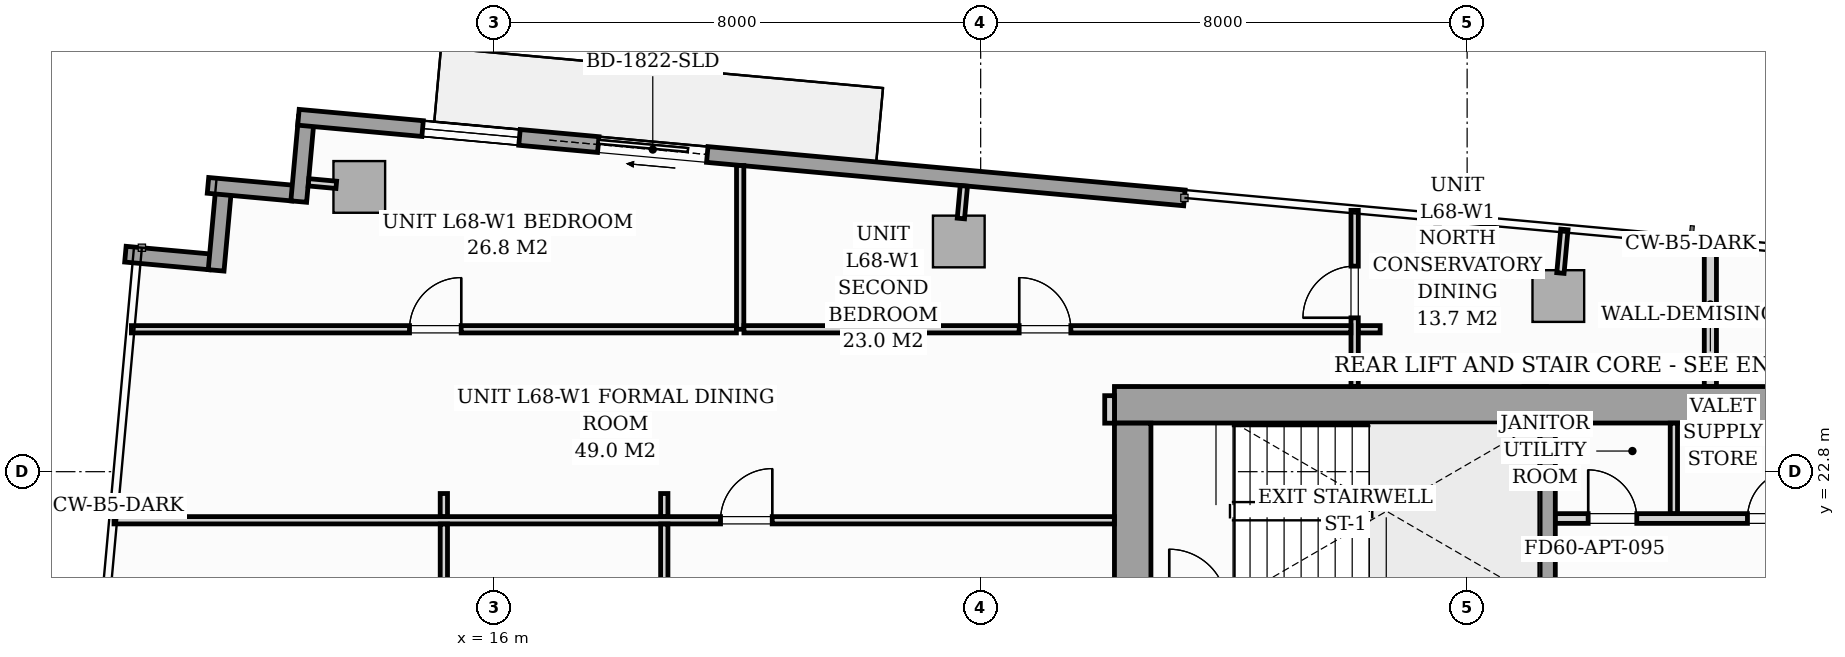
"""IFC4 building model, lengths in metres.
Left out: names, types, materials, properties, quantities, classifications, styles, units other than length and angle.
Written with IfcOpenShell. Run it as: python <this file> out.ifc"""

import sys

from ifc_helpers import new_model, si_unit, direction, frame, frame_2d, origin, origin_2d, place, context, subcontext, project, spatial, rectangle, i_section, extrude, source, transform, mapped, element, fill, save


model = new_model("IFC4")
c1 = context("Model", 3, precision=1e-05, world=origin(), true_north=direction((0.0, 1.0)))
c2 = subcontext(c1, "Body", "Model", "MODEL_VIEW")
j1 = project(units=[si_unit("LENGTHUNIT", "METRE"), si_unit("PLANEANGLEUNIT", "RADIAN")], contexts=[c1])
p1 = place(None, origin())
s1 = spatial("IfcSite", under=j1, at=p1, CompositionType="ELEMENT")
p2 = place(p1, origin())
s2 = spatial("IfcBuilding", under=s1, at=p2, CompositionType="ELEMENT")
p3 = place(p2, frame((0.0, 0.0, 236.4)))
s3 = spatial("IfcBuildingStorey", under=s2, at=p3, CompositionType="ELEMENT", Elevation=236.4)
m1 = source(origin(), c2, "Body", "SweptSolid", [
    extrude(i_section(OverallWidth=0.409, OverallDepth=0.425, WebThickness=0.033, FlangeThickness=0.052, FilletRadius=0.018, at=origin_2d()), origin(), (0.0, 0.0, 1.0), 3.296),
])
for number, where, z_axis, x_axis in (
    (1, (26.4, 24.0, 0.002), (0.0, 0.0, 1.0), (1.0, 0.0, 0.0)),
    (2, (33.12, 24.0, 0.002), (0.0, 0.0, 1.0), (1.0, 0.0, 0.0)),
):
    element("IfcColumn", number, at=place(p3, frame(where, z_axis=z_axis, x_axis=x_axis)), inside=s3, PredefinedType="PILASTER", context=c2, shape_type="MappedRepresentation", body=[
        mapped(m1, transform((0.0, 0.0, 0.0), scale=1.0)),
    ])
m2 = source(origin(), c2, "Body", "SweptSolid", [
    extrude(rectangle(XDim=0.85, YDim=0.85, at=origin_2d()), origin(), (0.0, 0.0, 1.0), 3.296),
])
for number, where, z_axis, x_axis in (
    (3, (13.781, 27.483, 0.002), (0.0, 0.0, 1.0), (0.996, -0.091, 0.0)),
    (4, (23.64, 26.585, 0.002), (0.0, 0.0, 1.0), (0.996, -0.091, 0.0)),
    (5, (33.5, 25.688, 0.002), (0.0, 0.0, 1.0), (0.996, -0.091, 0.0)),
):
    element("IfcColumn", number, at=place(p3, frame(where, z_axis=z_axis, x_axis=x_axis)), inside=s3, PredefinedType="COLUMN", context=c2, shape_type="MappedRepresentation", body=[
        mapped(m2, transform((0.0, 0.0, 0.0), scale=1.0)),
    ])
for number, where, z_axis, x_axis in (
    (6, (9.935, 26.377, 0.0), (0.0, 0.0, 1.0), (0.996, -0.091, 0.0)),
    (7, (11.427, 26.111, 0.0), (0.0, 0.0, 1.0), (0.091, 0.996, 0.0)),
):
    element("IfcWall", number, at=place(p3, frame(where, z_axis=z_axis, x_axis=x_axis)), inside=s3, PredefinedType="STANDARD", context=c2, shape_type="SweptSolid", body=[
        extrude(rectangle(XDim=1.395, YDim=0.26, at=frame_2d((0.698, 0.0))), origin(), (0.0, 0.0, 1.0), 3.04),
    ])
p4 = place(p3, frame((11.293, 27.508, 0.0), z_axis=(0.0, 0.0, 1.0), x_axis=(0.995883159782, -0.090646191665, 0.0)))
e8 = element("IfcWall", 8, at=p4, inside=s3, PredefinedType="STANDARD", context=c2, shape_type="SweptSolid", body=[
    extrude(rectangle(XDim=1.395, YDim=0.26, at=frame_2d((0.698, 0.0))), origin(), (0.0, 0.0, 1.0), 3.04),
])
p5 = place(p3, frame((12.785, 27.242, 0.0), z_axis=(0.0, 0.0, 1.0), x_axis=(0.090472632758, 0.995898942023, 0.0)))
e9 = element("IfcWall", 9, at=p5, inside=s3, PredefinedType="STANDARD", context=c2, shape_type="SweptSolid", body=[
    extrude(rectangle(XDim=1.395, YDim=0.26, at=frame_2d((0.698, 0.0))), origin(), (0.0, 0.0, 1.0), 3.04),
])
p6 = place(p3, frame((12.781, 28.628, 0.0), z_axis=(0.0, 0.0, 1.0), x_axis=(0.995884584572, -0.090630536861, 0.0)))
e10 = element("IfcWall", 10, at=p6, inside=s3, PredefinedType="STANDARD", context=c2, shape_type="SweptSolid", body=[
    extrude(rectangle(XDim=14.63, YDim=0.26, at=frame_2d((7.315, 0.0))), origin(), (0.0, 0.0, 1.0), 3.04),
])
p7 = place(p6, frame((4.951, 0.0, 0.0)))
e11 = element("IfcOpeningElement", 11, at=p7, cuts=e10, PredefinedType="OPENING", context=c2, shape_type="SweptSolid", body=[
    extrude(rectangle(XDim=1.8, YDim=2.06, at=frame_2d((0.9, 1.03))), frame((0.0, 0.14, 0.0), z_axis=(0.0, -1.0, 0.0), x_axis=(1.0, 0.0, 0.0)), (0.0, 0.0, 1.0), 0.28),
])
p8 = place(p6, frame((2.05, 0.0, 0.65)))
e12 = element("IfcOpeningElement", 12, at=p8, cuts=e10, PredefinedType="OPENING", context=c2, shape_type="SweptSolid", body=[
    extrude(rectangle(XDim=1.6, YDim=1.5, at=frame_2d((0.8, 0.75))), frame((0.0, 0.14, 0.0), z_axis=(0.0, -1.0, 0.0), x_axis=(1.0, 0.0, 0.0)), (0.0, 0.0, 1.0), 0.28),
])
p9 = place(p3, frame((26.2, 23.9, 0.0), z_axis=(0.0, 0.0, 1.0), x_axis=(1.0, 0.0, 0.0)))
e13 = element("IfcWall", 13, at=p9, inside=s3, PredefinedType="SHEAR", context=c2, shape_type="SweptSolid", body=[
    extrude(rectangle(XDim=19.6, YDim=0.6, at=frame_2d((9.8, 0.0))), origin(), (0.0, 0.0, 1.0), 3.3),
])
p10 = place(p3, frame((26.5, 17.802, 0.0), z_axis=(0.0, 0.0, 1.0), x_axis=(0.0, 1.0, 0.0)))
e14 = element("IfcWall", 14, at=p10, inside=s3, PredefinedType="SHEAR", context=c2, shape_type="SweptSolid", body=[
    extrude(rectangle(XDim=5.796, YDim=0.6, at=frame_2d((2.898, 0.0))), origin(), (0.0, 0.0, 1.0), 3.3),
])
p11 = place(p3, frame((33.325, 20.702, 0.0), z_axis=(0.0, 0.0, 1.0), x_axis=(0.0, 1.0, 0.0)))
e15 = element("IfcWall", 15, at=p11, inside=s3, PredefinedType="SOLIDWALL", context=c2, shape_type="SweptSolid", body=[
    extrude(rectangle(XDim=2.896, YDim=0.25, at=frame_2d((1.448, 0.0))), origin(), (0.0, 0.0, 1.0), 3.3),
])
p12 = place(p3, frame((33.452, 22.03, 0.0), z_axis=(0.0, 0.0, 1.0), x_axis=(1.0, 0.0, 0.0)))
e16 = element("IfcWall", 16, at=p12, inside=s3, PredefinedType="PARTITIONING", context=c2, shape_type="SweptSolid", body=[
    extrude(rectangle(XDim=5.096, YDim=0.16, at=frame_2d((2.548, 0.0))), origin(), (0.0, 0.0, 1.0), 3.04),
])
p13 = place(p12, frame((0.538, 0.0, 0.0)))
e17 = element("IfcOpeningElement", 17, at=p13, cuts=e16, PredefinedType="OPENING", context=c2, shape_type="SweptSolid", body=[
    extrude(rectangle(XDim=0.8, YDim=2.05, at=frame_2d((0.4, 1.025))), frame((0.0, 0.09, 0.0), z_axis=(0.0, -1.0, 0.0), x_axis=(1.0, 0.0, 0.0)), (0.0, 0.0, 1.0), 0.18),
])
p14 = place(p12, frame((3.158, 0.0, 0.0)))
e18 = element("IfcOpeningElement", 18, at=p14, cuts=e16, PredefinedType="OPENING", context=c2, shape_type="SweptSolid", body=[
    extrude(rectangle(XDim=0.8, YDim=2.05, at=frame_2d((0.4, 1.025))), frame((0.0, 0.09, 0.0), z_axis=(0.0, -1.0, 0.0), x_axis=(1.0, 0.0, 0.0)), (0.0, 0.0, 1.0), 0.18),
])
p15 = place(p3, frame((35.4, 22.112, 0.0), z_axis=(0.0, 0.0, 1.0), x_axis=(0.0, 1.0, 0.0)))
e19 = element("IfcWall", 19, at=p15, inside=s3, PredefinedType="PARTITIONING", context=c2, shape_type="SweptSolid", body=[
    extrude(rectangle(XDim=1.486, YDim=0.12, at=frame_2d((0.743, 0.0))), origin(), (0.0, 0.0, 1.0), 3.04),
])
p16 = place(p3, frame((26.12, 23.598, 0.0), z_axis=(0.0, 0.0, 1.0), x_axis=(0.0, 1.0, 0.0)))
e20 = element("IfcWall", 20, at=p16, inside=s3, PredefinedType="PARTITIONING", context=c2, shape_type="SweptSolid", body=[
    extrude(rectangle(XDim=0.452, YDim=0.16, at=frame_2d((0.226, 0.0))), origin(), (0.0, 0.0, 1.0), 3.04),
])
p17 = place(p3, frame((36.0, 24.202, 0.0), z_axis=(0.0, 0.0, 1.0), x_axis=(0.0, 1.0, 0.0)))
e21 = element("IfcWall", 21, at=p17, inside=s3, PredefinedType="PARTITIONING", context=c2, shape_type="SweptSolid", body=[
    extrude(rectangle(XDim=2.363, YDim=0.2, at=frame_2d((1.182, 0.0))), origin(), (0.0, 0.0, 1.0), 3.04),
])
p18 = place(p3, frame((30.15, 24.202, 0.0), z_axis=(0.0, 0.0, 1.0), x_axis=(0.0, 1.0, 0.0)))
e22 = element("IfcWall", 22, at=p18, inside=s3, PredefinedType="PARTITIONING", context=c2, shape_type="SweptSolid", body=[
    extrude(rectangle(XDim=2.896, YDim=0.12, at=frame_2d((1.448, 0.0))), origin(), (0.0, 0.0, 1.0), 3.04),
])
p19 = place(p18, frame((1.128, 0.0, 0.0)))
e23 = element("IfcOpeningElement", 23, at=p19, cuts=e22, PredefinedType="OPENING", context=c2, shape_type="SweptSolid", body=[
    extrude(rectangle(XDim=0.85, YDim=2.05, at=frame_2d((0.425, 1.025))), frame((0.0, 0.07, 0.0), z_axis=(0.0, -1.0, 0.0), x_axis=(1.0, 0.0, 0.0)), (0.0, 0.0, 1.0), 0.14),
])
p20 = place(p3, frame((20.045, 25.142, 0.0), z_axis=(0.0, 0.0, 1.0), x_axis=(0.0, 1.0, 0.0)))
e24 = element("IfcWall", 24, at=p20, inside=s3, PredefinedType="PARTITIONING", context=c2, shape_type="SweptSolid", body=[
    extrude(rectangle(XDim=2.692, YDim=0.12, at=frame_2d((1.346, 0.0))), origin(), (0.0, 0.0, 1.0), 3.04),
])
p21 = place(p3, frame((10.034, 25.142, 0.0), z_axis=(0.0, 0.0, 1.0), x_axis=(1.0, 0.0, 0.0)))
e25 = element("IfcWall", 25, at=p21, inside=s3, PredefinedType="PARTITIONING", context=c2, shape_type="SweptSolid", body=[
    extrude(rectangle(XDim=9.949, YDim=0.12, at=frame_2d((4.975, 0.0))), origin(), (0.0, 0.0, 1.0), 3.04),
])
p22 = place(p21, frame((4.573, 0.0, 0.0)))
e26 = element("IfcOpeningElement", 26, at=p22, cuts=e25, PredefinedType="OPENING", context=c2, shape_type="SweptSolid", body=[
    extrude(rectangle(XDim=0.85, YDim=2.05, at=frame_2d((0.425, 1.025))), frame((0.0, 0.07, 0.0), z_axis=(0.0, -1.0, 0.0), x_axis=(1.0, 0.0, 0.0)), (0.0, 0.0, 1.0), 0.14),
])
p23 = place(p3, frame((20.107, 25.142, 0.0), z_axis=(0.0, 0.0, 1.0), x_axis=(1.0, 0.0, 0.0)))
e27 = element("IfcWall", 27, at=p23, inside=s3, PredefinedType="PARTITIONING", context=c2, shape_type="SweptSolid", body=[
    extrude(rectangle(XDim=9.981, YDim=0.12, at=frame_2d((4.99, 0.0))), origin(), (0.0, 0.0, 1.0), 3.04),
])
p24 = place(p23, frame((4.526, 0.0, 0.0)))
e28 = element("IfcOpeningElement", 28, at=p24, cuts=e27, PredefinedType="OPENING", context=c2, shape_type="SweptSolid", body=[
    extrude(rectangle(XDim=0.85, YDim=2.05, at=frame_2d((0.425, 1.025))), frame((0.0, 0.07, 0.0), z_axis=(0.0, -1.0, 0.0), x_axis=(1.0, 0.0, 0.0)), (0.0, 0.0, 1.0), 0.14),
])
p25 = place(p3, frame((30.212, 25.142, 0.0), z_axis=(0.0, 0.0, 1.0), x_axis=(1.0, 0.0, 0.0)))
e29 = element("IfcWall", 29, at=p25, inside=s3, PredefinedType="PARTITIONING", context=c2, shape_type="SweptSolid", body=[
    extrude(rectangle(XDim=0.358, YDim=0.12, at=frame_2d((0.179, 0.0))), origin(), (0.0, 0.0, 1.0), 3.04),
])
p26 = place(p3, frame((9.748, 22.001, 0.0), z_axis=(0.0, 0.0, 1.0), x_axis=(1.0, 0.0, 0.0)))
e30 = element("IfcWall", 30, at=p26, inside=s3, PredefinedType="PARTITIONING", context=c2, shape_type="SweptSolid", body=[
    extrude(rectangle(XDim=16.45, YDim=0.12, at=frame_2d((8.225, 0.0))), origin(), (0.0, 0.0, 1.0), 3.04),
])
p27 = place(p26, frame((9.974, 0.0, 0.0)))
e31 = element("IfcOpeningElement", 31, at=p27, cuts=e30, PredefinedType="OPENING", context=c2, shape_type="SweptSolid", body=[
    extrude(rectangle(XDim=0.85, YDim=2.05, at=frame_2d((0.425, 1.025))), frame((0.0, 0.07, 0.0), z_axis=(0.0, -1.0, 0.0), x_axis=(1.0, 0.0, 0.0)), (0.0, 0.0, 1.0), 0.14),
])
p28 = place(p3, frame((15.172, 11.858, 0.0), z_axis=(0.0, 0.0, 1.0), x_axis=(0.0, 1.0, 0.0)))
e32 = element("IfcWall", 32, at=p28, inside=s3, PredefinedType="PARTITIONING", context=c2, shape_type="SweptSolid", body=[
    extrude(rectangle(XDim=10.081, YDim=0.12, at=frame_2d((5.041, 0.0))), origin(), (0.0, 0.0, 1.0), 3.04),
])
p29 = place(p28, frame((4.615, 0.0, 0.0)))
e33 = element("IfcOpeningElement", 33, at=p29, cuts=e32, PredefinedType="OPENING", context=c2, shape_type="SweptSolid", body=[
    extrude(rectangle(XDim=0.85, YDim=2.05, at=frame_2d((0.425, 1.025))), frame((0.0, 0.07, 0.0), z_axis=(0.0, -1.0, 0.0), x_axis=(1.0, 0.0, 0.0)), (0.0, 0.0, 1.0), 0.14),
])
p30 = place(p3, frame((15.172, 22.063, 0.0), z_axis=(0.0, 0.0, 1.0), x_axis=(0.0, 1.0, 0.0)))
e34 = element("IfcWall", 34, at=p30, inside=s3, PredefinedType="PARTITIONING", context=c2, shape_type="SweptSolid", body=[
    extrude(rectangle(XDim=0.378, YDim=0.12, at=frame_2d((0.189, 0.0))), origin(), (0.0, 0.0, 1.0), 3.04),
])
p31 = place(p3, frame((18.797, 11.858, 0.0), z_axis=(0.0, 0.0, 1.0), x_axis=(0.0, 1.0, 0.0)))
e35 = element("IfcWall", 35, at=p31, inside=s3, PredefinedType="PARTITIONING", context=c2, shape_type="SweptSolid", body=[
    extrude(rectangle(XDim=10.081, YDim=0.12, at=frame_2d((5.041, 0.0))), origin(), (0.0, 0.0, 1.0), 3.04),
])
p32 = place(p31, frame((4.615, 0.0, 0.0)))
e36 = element("IfcOpeningElement", 36, at=p32, cuts=e35, PredefinedType="OPENING", context=c2, shape_type="SweptSolid", body=[
    extrude(rectangle(XDim=0.85, YDim=2.05, at=frame_2d((0.425, 1.025))), frame((0.0, 0.07, 0.0), z_axis=(0.0, -1.0, 0.0), x_axis=(1.0, 0.0, 0.0)), (0.0, 0.0, 1.0), 0.14),
])
p33 = place(p3, frame((18.797, 22.063, 0.0), z_axis=(0.0, 0.0, 1.0), x_axis=(0.0, 1.0, 0.0)))
e37 = element("IfcWall", 37, at=p33, inside=s3, PredefinedType="PARTITIONING", context=c2, shape_type="SweptSolid", body=[
    extrude(rectangle(XDim=0.378, YDim=0.12, at=frame_2d((0.189, 0.0))), origin(), (0.0, 0.0, 1.0), 3.04),
])
p34 = place(p3, frame((13.403, 27.517, 0.0), z_axis=(0.0, 0.0, 1.0), x_axis=(-0.995884462012, 0.090631883588, 0.0)))
e38 = element("IfcWall", 38, at=p34, inside=s3, PredefinedType="PARTITIONING", context=c2, shape_type="SweptSolid", body=[
    extrude(rectangle(XDim=0.458, YDim=0.12, at=frame_2d((0.229, 0.0))), origin(), (0.0, 0.0, 1.0), 3.04),
])
p35 = place(p3, frame((23.675, 26.964, 0.0), z_axis=(0.0, 0.0, 1.0), x_axis=(0.090740281653, 0.995874591144, 0.0)))
e39 = element("IfcWall", 39, at=p35, inside=s3, PredefinedType="PARTITIONING", context=c2, shape_type="SweptSolid", body=[
    extrude(rectangle(XDim=0.538, YDim=0.12, at=frame_2d((0.269, 0.0))), origin(), (0.0, 0.0, 1.0), 3.04),
])
p36 = place(p3, frame((33.534, 26.067, 0.0), z_axis=(0.0, 0.0, 1.0), x_axis=(0.090535746043, 0.995893206468, 0.0)))
e40 = element("IfcWall", 40, at=p36, inside=s3, PredefinedType="PARTITIONING", context=c2, shape_type="SweptSolid", body=[
    extrude(rectangle(XDim=0.72, YDim=0.12, at=frame_2d((0.36, 0.0))), origin(), (0.0, 0.0, 1.0), 3.04),
])
m3 = source(origin(), c2, "Body", "SweptSolid", [
    extrude(rectangle(XDim=1.8, YDim=2.06, at=frame_2d((0.9, 1.03))), frame((0.0, 0.025, 0.0), z_axis=(0.0, -1.0, 0.0), x_axis=(1.0, 0.0, 0.0)), (0.0, 0.0, 1.0), 0.05),
])
p37 = place(p7, origin())
e41 = element("IfcDoor", 41, at=p37, inside=s3, OperationType="SLIDING_TO_LEFT", PredefinedType="DOOR", context=c2, shape_type="MappedRepresentation", body=[
    mapped(m3, transform((0.0, 0.0, 0.0), scale=1.0)),
])
fill(e11, e41)
m4 = source(origin(), c2, "Body", "SweptSolid", [
    extrude(rectangle(XDim=1.6, YDim=1.5, at=frame_2d((0.8, 0.75))), frame((0.0, 0.03, 0.0), z_axis=(0.0, -1.0, 0.0), x_axis=(1.0, 0.0, 0.0)), (0.0, 0.0, 1.0), 0.06),
])
p38 = place(p8, origin())
e42 = element("IfcWindow", 42, at=p38, inside=s3, PartitioningType="SINGLE_PANEL", PredefinedType="WINDOW", context=c2, shape_type="MappedRepresentation", body=[
    mapped(m4, transform((0.0, 0.0, 0.0), scale=1.0)),
])
fill(e12, e42)
m5 = source(origin(), c2, "Body", "SweptSolid", [
    extrude(rectangle(XDim=0.8, YDim=2.05, at=frame_2d((0.4, 1.025))), frame((0.0, 0.025, 0.0), z_axis=(0.0, -1.0, 0.0), x_axis=(1.0, 0.0, 0.0)), (0.0, 0.0, 1.0), 0.05),
])
p39 = place(p13, origin())
e43 = element("IfcDoor", 43, at=p39, inside=s3, OperationType="SINGLE_SWING_LEFT", PredefinedType="DOOR", context=c2, shape_type="MappedRepresentation", body=[
    mapped(m5, transform((0.0, 0.0, 0.0), scale=1.0)),
])
fill(e17, e43)
p40 = place(p14, origin())
e44 = element("IfcDoor", 44, at=p40, inside=s3, OperationType="SINGLE_SWING_RIGHT", PredefinedType="DOOR", context=c2, shape_type="MappedRepresentation", body=[
    mapped(m5, transform((0.0, 0.0, 0.0), scale=1.0)),
])
fill(e18, e44)
m6 = source(origin(), c2, "Body", "SweptSolid", [
    extrude(rectangle(XDim=0.85, YDim=2.05, at=frame_2d((0.425, 1.025))), frame((0.0, 0.025, 0.0), z_axis=(0.0, -1.0, 0.0), x_axis=(1.0, 0.0, 0.0)), (0.0, 0.0, 1.0), 0.05),
])
p41 = place(p19, origin())
e45 = element("IfcDoor", 45, at=p41, inside=s3, OperationType="SINGLE_SWING_LEFT", PredefinedType="DOOR", context=c2, shape_type="MappedRepresentation", body=[
    mapped(m6, transform((0.0, 0.0, 0.0), scale=1.0)),
])
fill(e23, e45)
p42 = place(p22, origin())
e46 = element("IfcDoor", 46, at=p42, inside=s3, OperationType="SINGLE_SWING_RIGHT", PredefinedType="DOOR", context=c2, shape_type="MappedRepresentation", body=[
    mapped(m6, transform((0.0, 0.0, 0.0), scale=1.0)),
])
fill(e26, e46)
p43 = place(p24, origin())
e47 = element("IfcDoor", 47, at=p43, inside=s3, OperationType="SINGLE_SWING_LEFT", PredefinedType="DOOR", context=c2, shape_type="MappedRepresentation", body=[
    mapped(m6, transform((0.0, 0.0, 0.0), scale=1.0)),
])
fill(e28, e47)
p44 = place(p27, origin())
e48 = element("IfcDoor", 48, at=p44, inside=s3, OperationType="SINGLE_SWING_RIGHT", PredefinedType="DOOR", context=c2, shape_type="MappedRepresentation", body=[
    mapped(m6, transform((0.0, 0.0, 0.0), scale=1.0)),
])
fill(e31, e48)
save(model, sys.argv[1])
